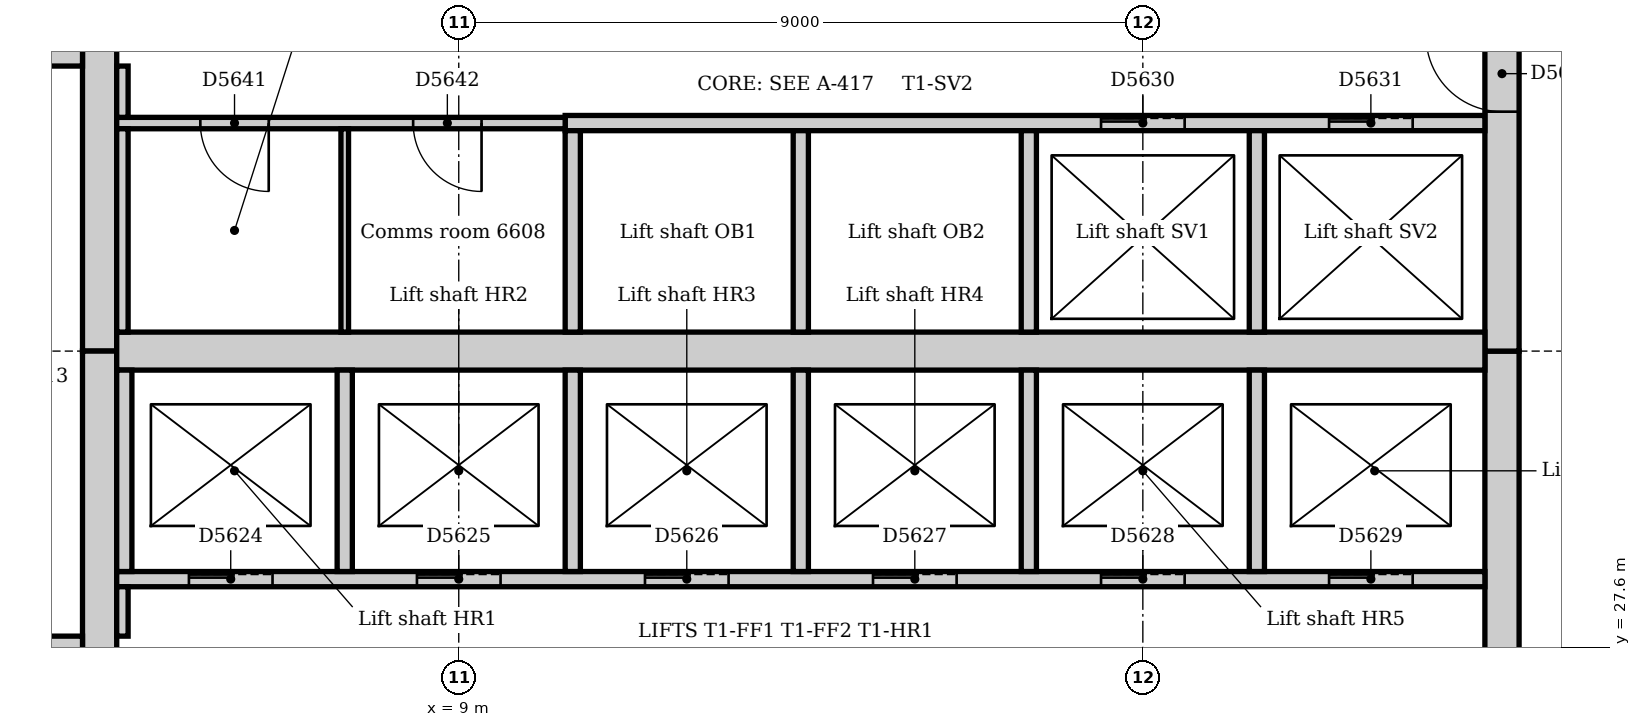
"""IFC4 building model, lengths in metres.
Left out: names, types, materials, properties, quantities, classifications, styles, units other than length and angle.
Written with IfcOpenShell. Run it as: python <this file> out.ifc"""

import sys

from ifc_helpers import new_model, si_unit, direction, frame, frame_2d, origin, place, context, subcontext, project, spatial, rectangle, extrude, element, fill, save


model = new_model("IFC4")
c1 = context("Model", 3, precision=1e-05, world=origin(), true_north=direction((0.0, 1.0)))
c2 = subcontext(c1, "Body", "Model", "MODEL_VIEW")
j1 = project(units=[si_unit("LENGTHUNIT", "METRE"), si_unit("PLANEANGLEUNIT", "RADIAN")], contexts=[c1])
p1 = place(None, origin())
s1 = spatial("IfcSite", under=j1, at=p1, CompositionType="ELEMENT")
p2 = place(p1, origin())
s2 = spatial("IfcBuilding", under=s1, at=p2, CompositionType="ELEMENT")
p3 = place(p2, frame((0.0, 0.0, 275.0)))
s3 = spatial("IfcBuildingStorey", under=s2, at=p3, CompositionType="ELEMENT", Elevation=275.0)
p4 = place(p3, frame((22.725, 21.0, 0.0), z_axis=(0.0, 0.0, 1.0), x_axis=(0.0, 1.0, 0.0)))
e1 = element("IfcWall", 1, at=p4, inside=s3, PredefinedType="SOLIDWALL", context=c2, shape_type="SweptSolid", body=[
    extrude(rectangle(XDim=10.5, YDim=0.45, at=frame_2d((5.25, 0.0))), origin(), (0.0, 0.0, 1.0), 4.0),
])
p5 = place(p4, frame((4.35, 0.0, 0.0)))
e2 = element("IfcOpeningElement", 2, at=p5, cuts=e1, PredefinedType="OPENING", context=c2, shape_type="SweptSolid", body=[
    extrude(rectangle(XDim=1.8, YDim=2.1, at=frame_2d((0.9, 1.05))), frame((0.0, 0.235, 0.0), z_axis=(0.0, -1.0, 0.0), x_axis=(1.0, 0.0, 0.0)), (0.0, 0.0, 1.0), 0.47),
])
p6 = place(p3, frame((22.725, 31.5, 0.0), z_axis=(0.0, 0.0, 1.0), x_axis=(0.0, 1.0, 0.0)))
e3 = element("IfcWall", 3, at=p6, inside=s3, PredefinedType="SOLIDWALL", context=c2, shape_type="SweptSolid", body=[
    extrude(rectangle(XDim=10.5, YDim=0.45, at=frame_2d((5.25, 0.0))), origin(), (0.0, 0.0, 1.0), 4.0),
])
p7 = place(p6, frame((3.15, 0.0, 0.0)))
e4 = element("IfcOpeningElement", 4, at=p7, cuts=e3, PredefinedType="OPENING", context=c2, shape_type="SweptSolid", body=[
    extrude(rectangle(XDim=1.0, YDim=2.1, at=frame_2d((0.5, 1.05))), frame((0.0, 0.235, 0.0), z_axis=(0.0, -1.0, 0.0), x_axis=(1.0, 0.0, 0.0)), (0.0, 0.0, 1.0), 0.47),
])
p8 = place(p6, frame((5.2, 0.0, 0.0)))
e5 = element("IfcOpeningElement", 5, at=p8, cuts=e3, PredefinedType="OPENING", context=c2, shape_type="SweptSolid", body=[
    extrude(rectangle(XDim=1.0, YDim=2.1, at=frame_2d((0.5, 1.05))), frame((0.0, 0.235, 0.0), z_axis=(0.0, -1.0, 0.0), x_axis=(1.0, 0.0, 0.0)), (0.0, 0.0, 1.0), 0.47),
])
p9 = place(p3, frame((4.275, 42.0, 0.0), z_axis=(0.0, 0.0, 1.0), x_axis=(0.0, -1.0, 0.0)))
e6 = element("IfcWall", 6, at=p9, inside=s3, PredefinedType="SOLIDWALL", context=c2, shape_type="SweptSolid", body=[
    extrude(rectangle(XDim=10.5, YDim=0.45, at=frame_2d((5.25, 0.0))), origin(), (0.0, 0.0, 1.0), 4.0),
])
p10 = place(p9, frame((5.3, 0.0, 0.0)))
e7 = element("IfcOpeningElement", 7, at=p10, cuts=e6, PredefinedType="OPENING", context=c2, shape_type="SweptSolid", body=[
    extrude(rectangle(XDim=1.0, YDim=2.1, at=frame_2d((0.5, 1.05))), frame((0.0, 0.235, 0.0), z_axis=(0.0, -1.0, 0.0), x_axis=(1.0, 0.0, 0.0)), (0.0, 0.0, 1.0), 0.47),
])
p11 = place(p3, frame((4.275, 31.5, 0.0), z_axis=(0.0, 0.0, 1.0), x_axis=(0.0, -1.0, 0.0)))
e8 = element("IfcWall", 8, at=p11, inside=s3, PredefinedType="SOLIDWALL", context=c2, shape_type="SweptSolid", body=[
    extrude(rectangle(XDim=10.5, YDim=0.45, at=frame_2d((5.25, 0.0))), origin(), (0.0, 0.0, 1.0), 4.0),
])
p12 = place(p11, frame((4.25, 0.0, 0.0)))
e9 = element("IfcOpeningElement", 9, at=p12, cuts=e8, PredefinedType="OPENING", context=c2, shape_type="SweptSolid", body=[
    extrude(rectangle(XDim=1.0, YDim=2.1, at=frame_2d((0.5, 1.05))), frame((0.0, 0.235, 0.0), z_axis=(0.0, -1.0, 0.0), x_axis=(1.0, 0.0, 0.0)), (0.0, 0.0, 1.0), 0.47),
])
p13 = place(p3, frame((4.5, 31.5, 0.0), z_axis=(0.0, 0.0, 1.0), x_axis=(1.0, 0.0, 0.0)))
e10 = element("IfcWall", 10, at=p13, inside=s3, PredefinedType="SOLIDWALL", context=c2, shape_type="SweptSolid", body=[
    extrude(rectangle(XDim=18.0, YDim=0.5, at=frame_2d((9.0, 0.0))), origin(), (0.0, 0.0, 1.0), 4.0),
])
p14 = place(p3, frame((4.05, 27.625, 0.0), z_axis=(0.0, 0.0, 1.0), x_axis=(-1.0, 0.0, 0.0)))
e11 = element("IfcWall", 11, at=p14, inside=s3, PredefinedType="SOLIDWALL", context=c2, shape_type="SweptSolid", body=[
    extrude(rectangle(XDim=3.69, YDim=0.25, at=frame_2d((1.845, 0.0))), origin(), (0.0, 0.0, 1.0), 4.0),
])
p15 = place(p14, frame((0.55, 0.0, 0.0)))
e12 = element("IfcOpeningElement", 12, at=p15, cuts=e11, PredefinedType="OPENING", context=c2, shape_type="SweptSolid", body=[
    extrude(rectangle(XDim=1.0, YDim=2.1, at=frame_2d((0.5, 1.05))), frame((0.0, 0.135, 0.0), z_axis=(0.0, -1.0, 0.0), x_axis=(1.0, 0.0, 0.0)), (0.0, 0.0, 1.0), 0.27),
])
p16 = place(p3, frame((0.36, 35.375, 0.0), z_axis=(0.0, 0.0, 1.0), x_axis=(1.0, 0.0, 0.0)))
e13 = element("IfcWall", 13, at=p16, inside=s3, PredefinedType="SOLIDWALL", context=c2, shape_type="SweptSolid", body=[
    extrude(rectangle(XDim=3.69, YDim=0.25, at=frame_2d((1.845, 0.0))), origin(), (0.0, 0.0, 1.0), 4.0),
])
p17 = place(p16, frame((2.14, 0.0, 0.0)))
e14 = element("IfcOpeningElement", 14, at=p17, cuts=e13, PredefinedType="OPENING", context=c2, shape_type="SweptSolid", body=[
    extrude(rectangle(XDim=1.0, YDim=2.1, at=frame_2d((0.5, 1.05))), frame((0.0, 0.135, 0.0), z_axis=(0.0, -1.0, 0.0), x_axis=(1.0, 0.0, 0.0)), (0.0, 0.0, 1.0), 0.27),
])
p18 = place(p3, frame((4.5, 28.5, 0.0), z_axis=(0.0, 0.0, 1.0), x_axis=(1.0, 0.0, 0.0)))
e15 = element("IfcWall", 15, at=p18, inside=s3, PredefinedType="PARTITIONING", context=c2, shape_type="SweptSolid", body=[
    extrude(rectangle(XDim=18.0, YDim=0.2, at=frame_2d((9.0, 0.0))), origin(), (0.0, 0.0, 1.0), 3.85),
])
p19 = place(p18, frame((0.95, 0.0, 0.0)))
e16 = element("IfcOpeningElement", 16, at=p19, cuts=e15, PredefinedType="OPENING", context=c2, shape_type="SweptSolid", body=[
    extrude(rectangle(XDim=1.1, YDim=2.1, at=frame_2d((0.55, 1.05))), frame((0.0, 0.11, 0.0), z_axis=(0.0, -1.0, 0.0), x_axis=(1.0, 0.0, 0.0)), (0.0, 0.0, 1.0), 0.22),
])
p20 = place(p18, frame((3.95, 0.0, 0.0)))
e17 = element("IfcOpeningElement", 17, at=p20, cuts=e15, PredefinedType="OPENING", context=c2, shape_type="SweptSolid", body=[
    extrude(rectangle(XDim=1.1, YDim=2.1, at=frame_2d((0.55, 1.05))), frame((0.0, 0.11, 0.0), z_axis=(0.0, -1.0, 0.0), x_axis=(1.0, 0.0, 0.0)), (0.0, 0.0, 1.0), 0.22),
])
p21 = place(p18, frame((6.95, 0.0, 0.0)))
e18 = element("IfcOpeningElement", 18, at=p21, cuts=e15, PredefinedType="OPENING", context=c2, shape_type="SweptSolid", body=[
    extrude(rectangle(XDim=1.1, YDim=2.1, at=frame_2d((0.55, 1.05))), frame((0.0, 0.11, 0.0), z_axis=(0.0, -1.0, 0.0), x_axis=(1.0, 0.0, 0.0)), (0.0, 0.0, 1.0), 0.22),
])
p22 = place(p18, frame((9.95, 0.0, 0.0)))
e19 = element("IfcOpeningElement", 19, at=p22, cuts=e15, PredefinedType="OPENING", context=c2, shape_type="SweptSolid", body=[
    extrude(rectangle(XDim=1.1, YDim=2.1, at=frame_2d((0.55, 1.05))), frame((0.0, 0.11, 0.0), z_axis=(0.0, -1.0, 0.0), x_axis=(1.0, 0.0, 0.0)), (0.0, 0.0, 1.0), 0.22),
])
p23 = place(p18, frame((12.95, 0.0, 0.0)))
e20 = element("IfcOpeningElement", 20, at=p23, cuts=e15, PredefinedType="OPENING", context=c2, shape_type="SweptSolid", body=[
    extrude(rectangle(XDim=1.1, YDim=2.1, at=frame_2d((0.55, 1.05))), frame((0.0, 0.11, 0.0), z_axis=(0.0, -1.0, 0.0), x_axis=(1.0, 0.0, 0.0)), (0.0, 0.0, 1.0), 0.22),
])
p24 = place(p18, frame((15.95, 0.0, 0.0)))
e21 = element("IfcOpeningElement", 21, at=p24, cuts=e15, PredefinedType="OPENING", context=c2, shape_type="SweptSolid", body=[
    extrude(rectangle(XDim=1.1, YDim=2.1, at=frame_2d((0.55, 1.05))), frame((0.0, 0.11, 0.0), z_axis=(0.0, -1.0, 0.0), x_axis=(1.0, 0.0, 0.0)), (0.0, 0.0, 1.0), 0.22),
])
p25 = place(p3, frame((10.4, 34.5, 0.0), z_axis=(0.0, 0.0, 1.0), x_axis=(1.0, 0.0, 0.0)))
e22 = element("IfcWall", 22, at=p25, inside=s3, PredefinedType="PARTITIONING", context=c2, shape_type="SweptSolid", body=[
    extrude(rectangle(XDim=12.1, YDim=0.2, at=frame_2d((6.05, 0.0))), origin(), (0.0, 0.0, 1.0), 3.85),
])
p26 = place(p25, frame((7.05, 0.0, 0.0)))
e23 = element("IfcOpeningElement", 23, at=p26, cuts=e22, PredefinedType="OPENING", context=c2, shape_type="SweptSolid", body=[
    extrude(rectangle(XDim=1.1, YDim=2.1, at=frame_2d((0.55, 1.05))), frame((0.0, 0.11, 0.0), z_axis=(0.0, -1.0, 0.0), x_axis=(1.0, 0.0, 0.0)), (0.0, 0.0, 1.0), 0.22),
])
p27 = place(p25, frame((10.05, 0.0, 0.0)))
e24 = element("IfcOpeningElement", 24, at=p27, cuts=e22, PredefinedType="OPENING", context=c2, shape_type="SweptSolid", body=[
    extrude(rectangle(XDim=1.1, YDim=2.1, at=frame_2d((0.55, 1.05))), frame((0.0, 0.11, 0.0), z_axis=(0.0, -1.0, 0.0), x_axis=(1.0, 0.0, 0.0)), (0.0, 0.0, 1.0), 0.22),
])
for number, where, z_axis, x_axis in (
    (25, (10.5, 28.6, 0.0), (0.0, 0.0, 1.0), (0.0, 1.0, 0.0)),
    (26, (10.5, 31.75, 0.0), (0.0, 0.0, 1.0), (0.0, 1.0, 0.0)),
    (27, (13.5, 28.6, 0.0), (0.0, 0.0, 1.0), (0.0, 1.0, 0.0)),
    (28, (13.5, 31.75, 0.0), (0.0, 0.0, 1.0), (0.0, 1.0, 0.0)),
    (29, (16.5, 28.6, 0.0), (0.0, 0.0, 1.0), (0.0, 1.0, 0.0)),
    (30, (16.5, 31.75, 0.0), (0.0, 0.0, 1.0), (0.0, 1.0, 0.0)),
    (31, (19.5, 28.6, 0.0), (0.0, 0.0, 1.0), (0.0, 1.0, 0.0)),
    (32, (19.5, 31.75, 0.0), (0.0, 0.0, 1.0), (0.0, 1.0, 0.0)),
    (33, (4.6, 28.6, 0.0), (0.0, 0.0, 1.0), (0.0, 1.0, 0.0)),
    (34, (7.5, 28.6, 0.0), (0.0, 0.0, 1.0), (0.0, 1.0, 0.0)),
):
    element("IfcWall", number, at=place(p3, frame(where, z_axis=z_axis, x_axis=x_axis)), inside=s3, PredefinedType="PARTITIONING", context=c2, shape_type="SweptSolid", body=[
        extrude(rectangle(XDim=2.65, YDim=0.2, at=frame_2d((1.325, 0.0))), origin(), (0.0, 0.0, 1.0), 3.85),
    ])
p28 = place(p3, frame((4.5, 34.5, 0.0), z_axis=(0.0, 0.0, 1.0), x_axis=(1.0, 0.0, 0.0)))
e35 = element("IfcWall", 35, at=p28, inside=s3, PredefinedType="PARTITIONING", context=c2, shape_type="SweptSolid", body=[
    extrude(rectangle(XDim=5.9, YDim=0.15, at=frame_2d((2.95, 0.0))), origin(), (0.0, 0.0, 1.0), 3.85),
])
p29 = place(p28, frame((1.1, 0.0, 0.0)))
e36 = element("IfcOpeningElement", 36, at=p29, cuts=e35, PredefinedType="OPENING", context=c2, shape_type="SweptSolid", body=[
    extrude(rectangle(XDim=0.9, YDim=2.1, at=frame_2d((0.45, 1.05))), frame((0.0, 0.085, 0.0), z_axis=(0.0, -1.0, 0.0), x_axis=(1.0, 0.0, 0.0)), (0.0, 0.0, 1.0), 0.17),
])
p30 = place(p28, frame((3.9, 0.0, 0.0)))
e37 = element("IfcOpeningElement", 37, at=p30, cuts=e35, PredefinedType="OPENING", context=c2, shape_type="SweptSolid", body=[
    extrude(rectangle(XDim=0.9, YDim=2.1, at=frame_2d((0.45, 1.05))), frame((0.0, 0.085, 0.0), z_axis=(0.0, -1.0, 0.0), x_axis=(1.0, 0.0, 0.0)), (0.0, 0.0, 1.0), 0.17),
])
p31 = place(p3, frame((4.575, 34.575, 0.0), z_axis=(0.0, 0.0, 1.0), x_axis=(0.0, 1.0, 0.0)))
e38 = element("IfcWall", 38, at=p31, inside=s3, PredefinedType="PARTITIONING", context=c2, shape_type="SweptSolid", body=[
    extrude(rectangle(XDim=0.675, YDim=0.15, at=frame_2d((0.338, 0.0))), origin(), (0.0, 0.0, 1.0), 3.85),
])
p32 = place(p3, frame((4.575, 31.75, 0.0), z_axis=(0.0, 0.0, 1.0), x_axis=(0.0, 1.0, 0.0)))
e39 = element("IfcWall", 39, at=p32, inside=s3, PredefinedType="PARTITIONING", context=c2, shape_type="SweptSolid", body=[
    extrude(rectangle(XDim=2.675, YDim=0.15, at=frame_2d((1.337, 0.0))), origin(), (0.0, 0.0, 1.0), 3.85),
])
p33 = place(p3, frame((4.575, 27.75, 0.0), z_axis=(0.0, 0.0, 1.0), x_axis=(0.0, 1.0, 0.0)))
e40 = element("IfcWall", 40, at=p33, inside=s3, PredefinedType="PARTITIONING", context=c2, shape_type="SweptSolid", body=[
    extrude(rectangle(XDim=0.65, YDim=0.15, at=frame_2d((0.325, 0.0))), origin(), (0.0, 0.0, 1.0), 3.85),
])
p34 = place(p3, frame((7.5, 31.75, 0.0), z_axis=(0.0, 0.0, 1.0), x_axis=(0.0, 1.0, 0.0)))
e41 = element("IfcWall", 41, at=p34, inside=s3, PredefinedType="PARTITIONING", context=c2, shape_type="SweptSolid", body=[
    extrude(rectangle(XDim=2.675, YDim=0.1, at=frame_2d((1.337, 0.0))), origin(), (0.0, 0.0, 1.0), 3.85),
])
p35 = place(p19, origin())
e42 = element("IfcDoor", 42, at=p35, inside=s3, OperationType="SLIDING_TO_LEFT", PredefinedType="DOOR", context=c2, shape_type="SweptSolid", body=[
    extrude(rectangle(XDim=1.1, YDim=2.1, at=frame_2d((0.55, 1.05))), frame((0.0, 0.025, 0.0), z_axis=(0.0, -1.0, 0.0), x_axis=(1.0, 0.0, 0.0)), (0.0, 0.0, 1.0), 0.05),
])
fill(e16, e42)
p36 = place(p20, origin())
e43 = element("IfcDoor", 43, at=p36, inside=s3, OperationType="SLIDING_TO_LEFT", PredefinedType="DOOR", context=c2, shape_type="SweptSolid", body=[
    extrude(rectangle(XDim=1.1, YDim=2.1, at=frame_2d((0.55, 1.05))), frame((0.0, 0.025, 0.0), z_axis=(0.0, -1.0, 0.0), x_axis=(1.0, 0.0, 0.0)), (0.0, 0.0, 1.0), 0.05),
])
fill(e17, e43)
p37 = place(p21, origin())
e44 = element("IfcDoor", 44, at=p37, inside=s3, OperationType="SLIDING_TO_LEFT", PredefinedType="DOOR", context=c2, shape_type="SweptSolid", body=[
    extrude(rectangle(XDim=1.1, YDim=2.1, at=frame_2d((0.55, 1.05))), frame((0.0, 0.025, 0.0), z_axis=(0.0, -1.0, 0.0), x_axis=(1.0, 0.0, 0.0)), (0.0, 0.0, 1.0), 0.05),
])
fill(e18, e44)
p38 = place(p22, origin())
e45 = element("IfcDoor", 45, at=p38, inside=s3, OperationType="SLIDING_TO_LEFT", PredefinedType="DOOR", context=c2, shape_type="SweptSolid", body=[
    extrude(rectangle(XDim=1.1, YDim=2.1, at=frame_2d((0.55, 1.05))), frame((0.0, 0.025, 0.0), z_axis=(0.0, -1.0, 0.0), x_axis=(1.0, 0.0, 0.0)), (0.0, 0.0, 1.0), 0.05),
])
fill(e19, e45)
p39 = place(p23, origin())
e46 = element("IfcDoor", 46, at=p39, inside=s3, OperationType="SLIDING_TO_LEFT", PredefinedType="DOOR", context=c2, shape_type="SweptSolid", body=[
    extrude(rectangle(XDim=1.1, YDim=2.1, at=frame_2d((0.55, 1.05))), frame((0.0, 0.025, 0.0), z_axis=(0.0, -1.0, 0.0), x_axis=(1.0, 0.0, 0.0)), (0.0, 0.0, 1.0), 0.05),
])
fill(e20, e46)
p40 = place(p24, origin())
e47 = element("IfcDoor", 47, at=p40, inside=s3, OperationType="SLIDING_TO_LEFT", PredefinedType="DOOR", context=c2, shape_type="SweptSolid", body=[
    extrude(rectangle(XDim=1.1, YDim=2.1, at=frame_2d((0.55, 1.05))), frame((0.0, 0.025, 0.0), z_axis=(0.0, -1.0, 0.0), x_axis=(1.0, 0.0, 0.0)), (0.0, 0.0, 1.0), 0.05),
])
fill(e21, e47)
p41 = place(p26, origin())
e48 = element("IfcDoor", 48, at=p41, inside=s3, OperationType="SLIDING_TO_LEFT", PredefinedType="DOOR", context=c2, shape_type="SweptSolid", body=[
    extrude(rectangle(XDim=1.1, YDim=2.1, at=frame_2d((0.55, 1.05))), frame((0.0, 0.025, 0.0), z_axis=(0.0, -1.0, 0.0), x_axis=(1.0, 0.0, 0.0)), (0.0, 0.0, 1.0), 0.05),
])
fill(e23, e48)
p42 = place(p27, origin())
e49 = element("IfcDoor", 49, at=p42, inside=s3, OperationType="SLIDING_TO_LEFT", PredefinedType="DOOR", context=c2, shape_type="SweptSolid", body=[
    extrude(rectangle(XDim=1.1, YDim=2.1, at=frame_2d((0.55, 1.05))), frame((0.0, 0.025, 0.0), z_axis=(0.0, -1.0, 0.0), x_axis=(1.0, 0.0, 0.0)), (0.0, 0.0, 1.0), 0.05),
])
fill(e24, e49)
p43 = place(p7, origin())
e50 = element("IfcDoor", 50, at=p43, inside=s3, OperationType="SINGLE_SWING_RIGHT", PredefinedType="DOOR", context=c2, shape_type="SweptSolid", body=[
    extrude(rectangle(XDim=1.0, YDim=2.1, at=frame_2d((0.5, 1.05))), frame((0.0, 0.025, 0.0), z_axis=(0.0, -1.0, 0.0), x_axis=(1.0, 0.0, 0.0)), (0.0, 0.0, 1.0), 0.05),
])
fill(e4, e50)
p44 = place(p29, frame((0.9, 0.0, 0.0), z_axis=(0.0, 0.0, 1.0), x_axis=(-1.0, 0.0, 0.0)))
e51 = element("IfcDoor", 51, at=p44, inside=s3, OperationType="SINGLE_SWING_LEFT", PredefinedType="DOOR", context=c2, shape_type="SweptSolid", body=[
    extrude(rectangle(XDim=0.9, YDim=2.1, at=frame_2d((0.45, 1.05))), frame((0.0, 0.025, 0.0), z_axis=(0.0, -1.0, 0.0), x_axis=(1.0, 0.0, 0.0)), (0.0, 0.0, 1.0), 0.05),
])
fill(e36, e51)
p45 = place(p30, frame((0.9, 0.0, 0.0), z_axis=(0.0, 0.0, 1.0), x_axis=(-1.0, 0.0, 0.0)))
e52 = element("IfcDoor", 52, at=p45, inside=s3, OperationType="SINGLE_SWING_LEFT", PredefinedType="DOOR", context=c2, shape_type="SweptSolid", body=[
    extrude(rectangle(XDim=0.9, YDim=2.1, at=frame_2d((0.45, 1.05))), frame((0.0, 0.025, 0.0), z_axis=(0.0, -1.0, 0.0), x_axis=(1.0, 0.0, 0.0)), (0.0, 0.0, 1.0), 0.05),
])
fill(e37, e52)
save(model, sys.argv[1])
